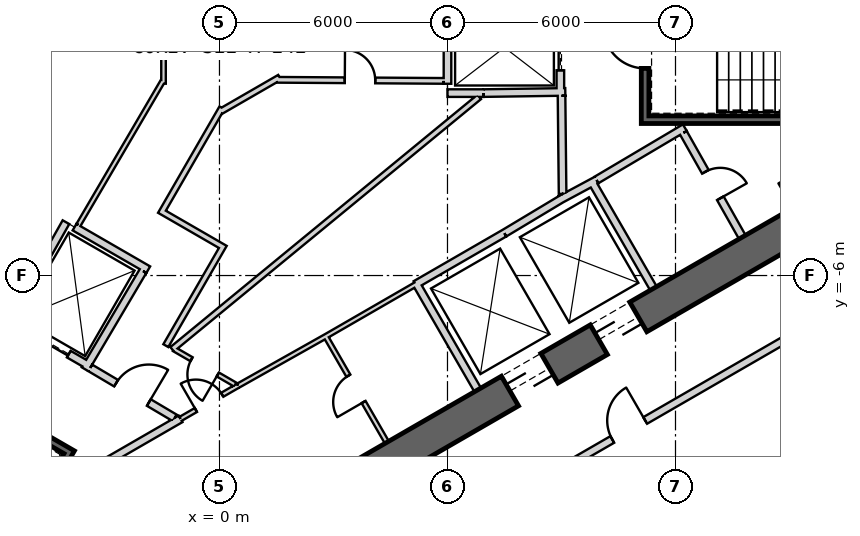
"""IFC4 building model, lengths in metres.
Left out: names, types, materials, properties, quantities, classifications, styles, units other than length and angle.
Written with IfcOpenShell. Run it as: python <this file> out.ifc"""

import sys

from ifc_helpers import new_model, si_unit, direction, frame, frame_2d, origin, place, context, subcontext, project, spatial, rectangle, extrude, element, fill, save


model = new_model("IFC4")
c1 = context("Model", 3, precision=1e-05, world=origin(), true_north=direction((0.0, 1.0)))
c2 = subcontext(c1, "Body", "Model", "MODEL_VIEW")
j1 = project(units=[si_unit("LENGTHUNIT", "METRE"), si_unit("PLANEANGLEUNIT", "RADIAN")], contexts=[c1])
p1 = place(None, origin())
s1 = spatial("IfcSite", under=j1, at=p1, CompositionType="ELEMENT")
p2 = place(p1, origin())
s2 = spatial("IfcBuilding", under=s1, at=p2, CompositionType="ELEMENT")
p3 = place(p2, frame((0.0, 0.0, 368.9)))
s3 = spatial("IfcBuildingStorey", under=s2, at=p3, CompositionType="ELEMENT", Elevation=368.9)
p4 = place(p3, frame((-7.825, -17.97, 0.0), z_axis=(0.0, 0.0, 1.0), x_axis=(0.866028369851, 0.499994862586, 0.0)))
e1 = element("IfcWall", 1, at=p4, inside=s3, PredefinedType="SHEAR", context=c2, shape_type="SweptSolid", body=[
    extrude(rectangle(XDim=31.523, YDim=0.9, at=frame_2d((15.762, 0.0))), origin(), (0.0, 0.0, 1.0), 3.9),
])
p5 = place(p4, frame((17.862, 0.0, 0.0)))
e2 = element("IfcOpeningElement", 2, at=p5, cuts=e1, PredefinedType="OPENING", context=c2, shape_type="SweptSolid", body=[
    extrude(rectangle(XDim=1.2, YDim=2.4, at=frame_2d((0.6, 1.2))), frame((0.0, 0.46, 0.0), z_axis=(0.0, -1.0, 0.0), x_axis=(1.0, 0.0, 0.0)), (0.0, 0.0, 1.0), 0.92),
])
p6 = place(p4, frame((20.562, 0.0, 0.0)))
e3 = element("IfcOpeningElement", 3, at=p6, cuts=e1, PredefinedType="OPENING", context=c2, shape_type="SweptSolid", body=[
    extrude(rectangle(XDim=1.2, YDim=2.4, at=frame_2d((0.6, 1.2))), frame((0.0, 0.46, 0.0), z_axis=(0.0, -1.0, 0.0), x_axis=(1.0, 0.0, 0.0)), (0.0, 0.0, 1.0), 0.92),
])
p7 = place(p4, frame((26.712, 0.0, 0.0)))
e4 = element("IfcOpeningElement", 4, at=p7, cuts=e1, PredefinedType="OPENING", context=c2, shape_type="SweptSolid", body=[
    extrude(rectangle(XDim=1.2, YDim=2.4, at=frame_2d((0.6, 1.2))), frame((0.0, 0.46, 0.0), z_axis=(0.0, -1.0, 0.0), x_axis=(1.0, 0.0, 0.0)), (0.0, 0.0, 1.0), 0.92),
])
p8 = place(p4, frame((3.612, 0.0, 0.0)))
e5 = element("IfcOpeningElement", 5, at=p8, cuts=e1, PredefinedType="OPENING", context=c2, shape_type="SweptSolid", body=[
    extrude(rectangle(XDim=1.2, YDim=2.4, at=frame_2d((0.6, 1.2))), frame((0.0, 0.46, 0.0), z_axis=(0.0, -1.0, 0.0), x_axis=(1.0, 0.0, 0.0)), (0.0, 0.0, 1.0), 0.92),
])
p9 = place(p3, frame((6.795, -9.01, 0.0), z_axis=(0.0, 0.0, 1.0), x_axis=(-0.499984717929, 0.866034226713, 0.0)))
e6 = element("IfcWall", 6, at=p9, inside=s3, PredefinedType="PLUMBINGWALL", context=c2, shape_type="SweptSolid", body=[
    extrude(rectangle(XDim=3.25, YDim=0.2, at=frame_2d((1.625, 0.0))), origin(), (0.0, 0.0, 1.0), 3.6),
])
p10 = place(p3, frame((5.159, -6.236, 0.0), z_axis=(0.0, 0.0, 1.0), x_axis=(0.866036505625, 0.499980770555, 0.0)))
e7 = element("IfcWall", 7, at=p10, inside=s3, PredefinedType="PLUMBINGWALL", context=c2, shape_type="SweptSolid", body=[
    extrude(rectangle(XDim=2.7, YDim=0.2, at=frame_2d((1.35, 0.0))), origin(), (0.0, 0.0, 1.0), 3.6),
])
p11 = place(p3, frame((9.795, -3.525, 0.0), z_axis=(0.0, 0.0, 1.0), x_axis=(0.499984717929, -0.866034226713, 0.0)))
e8 = element("IfcWall", 8, at=p11, inside=s3, PredefinedType="PLUMBINGWALL", context=c2, shape_type="SweptSolid", body=[
    extrude(rectangle(XDim=3.25, YDim=0.2, at=frame_2d((1.625, 0.0))), origin(), (0.0, 0.0, 1.0), 3.6),
])
p12 = place(p3, frame((8.974, -3.999, 0.0), z_axis=(0.0, 0.0, 1.0), x_axis=(0.880907015104, 0.473289373154, 0.0)))
e9 = element("IfcWall", 9, at=p12, inside=s3, PredefinedType="PLUMBINGWALL", context=c2, shape_type="SweptSolid", body=[
    extrude(rectangle(XDim=1.078, YDim=0.2, at=frame_2d((0.539, 0.0))), origin(), (0.0, 0.0, 1.0), 3.6),
])
p13 = place(p3, frame((7.493, -4.878, 0.0), z_axis=(0.0, 0.0, 1.0), x_axis=(0.859981807212, 0.510324691999, 0.0)))
e10 = element("IfcWall", 10, at=p13, inside=s3, PredefinedType="PLUMBINGWALL", context=c2, shape_type="SweptSolid", body=[
    extrude(rectangle(XDim=1.845, YDim=0.2, at=frame_2d((0.922, 0.0))), origin(), (0.0, 0.0, 1.0), 3.6),
])
p14 = place(p3, frame((11.1, -1.9, -0.3), z_axis=(0.0, 0.0, 1.0), x_axis=(1.0, 0.0, 0.0)))
e11 = element("IfcWall", 11, at=p14, inside=s3, PredefinedType="SHEAR", context=c2, shape_type="SweptSolid", body=[
    extrude(rectangle(XDim=7.9, YDim=0.2, at=frame_2d((3.95, 0.0))), origin(), (0.0, 0.0, 1.0), 3.9),
])
p15 = place(p3, frame((11.2, -1.8, -0.3), z_axis=(0.0, 0.0, 1.0), x_axis=(0.0, 1.0, 0.0)))
e12 = element("IfcWall", 12, at=p15, inside=s3, PredefinedType="SHEAR", context=c2, shape_type="SweptSolid", body=[
    extrude(rectangle(XDim=3.6, YDim=0.2, at=frame_2d((1.8, 0.0))), origin(), (0.0, 0.0, 1.0), 3.9),
])
p16 = place(p15, frame((1.25, 0.0, 0.3)))
e13 = element("IfcOpeningElement", 13, at=p16, cuts=e12, PredefinedType="OPENING", context=c2, shape_type="SweptSolid", body=[
    extrude(rectangle(XDim=1.1, YDim=2.1, at=frame_2d((0.55, 1.05))), frame((0.0, 0.11, 0.0), z_axis=(0.0, -1.0, 0.0), x_axis=(1.0, 0.0, 0.0)), (0.0, 0.0, 1.0), 0.22),
])
p17 = place(p3, frame((8.97, 1.2, 0.0), z_axis=(0.0, 0.0, 1.0), x_axis=(0.0, -1.0, 0.0)))
e14 = element("IfcWall", 14, at=p17, inside=s3, PredefinedType="PLUMBINGWALL", context=c2, shape_type="SweptSolid", body=[
    extrude(rectangle(XDim=2.4, YDim=0.2, at=frame_2d((1.2, 0.0))), origin(), (0.0, 0.0, 1.0), 3.6),
])
p18 = place(p17, frame((0.6, 0.0, 0.0)))
e15 = element("IfcOpeningElement", 15, at=p18, cuts=e14, PredefinedType="OPENING", context=c2, shape_type="SweptSolid", body=[
    extrude(rectangle(XDim=1.2, YDim=2.4, at=frame_2d((0.6, 1.2))), frame((0.0, 0.11, 0.0), z_axis=(0.0, -1.0, 0.0), x_axis=(1.0, 0.0, 0.0)), (0.0, 0.0, 1.0), 0.22),
])
p19 = place(p3, frame((5.9, -1.201, 0.0), z_axis=(0.0, 0.0, 1.0), x_axis=(0.999950064753, 0.009993397809, 0.0)))
e16 = element("IfcWall", 16, at=p19, inside=s3, PredefinedType="PLUMBINGWALL", context=c2, shape_type="SweptSolid", body=[
    extrude(rectangle(XDim=3.2, YDim=0.2, at=frame_2d((1.6, 0.0))), origin(), (0.0, 0.0, 1.0), 3.6),
])
p20 = place(p3, frame((6.0, -1.1, 0.0), z_axis=(0.0, 0.0, 1.0), x_axis=(0.0, 1.0, 0.0)))
e17 = element("IfcWall", 17, at=p20, inside=s3, PredefinedType="PLUMBINGWALL", context=c2, shape_type="SweptSolid", body=[
    extrude(rectangle(XDim=2.28, YDim=0.2, at=frame_2d((1.14, 0.0))), origin(), (0.0, 0.0, 1.0), 3.6),
])
p21 = place(p3, frame((-3.905, -10.563, -0.3), z_axis=(0.0, 0.0, 1.0), x_axis=(-0.500012932018, -0.866017937352, 0.0)))
e18 = element("IfcWall", 18, at=p21, inside=s3, PredefinedType="SHEAR", context=c2, shape_type="SweptSolid", body=[
    extrude(rectangle(XDim=8.1, YDim=0.2, at=frame_2d((4.05, 0.0))), origin(), (0.0, 0.0, 1.0), 3.9),
])
p22 = place(p3, frame((-4.041, -10.599, -0.3), z_axis=(0.0, 0.0, 1.0), x_axis=(-0.866047807691, 0.499961193289, 0.0)))
e19 = element("IfcWall", 19, at=p22, inside=s3, PredefinedType="SHEAR", context=c2, shape_type="SweptSolid", body=[
    extrude(rectangle(XDim=3.6, YDim=0.2, at=frame_2d((1.8, 0.0))), origin(), (0.0, 0.0, 1.0), 3.9),
])
p23 = place(p22, frame((1.25, 0.0, 0.3)))
e20 = element("IfcOpeningElement", 20, at=p23, cuts=e19, PredefinedType="OPENING", context=c2, shape_type="SweptSolid", body=[
    extrude(rectangle(XDim=1.1, YDim=2.1, at=frame_2d((0.55, 1.05))), frame((0.0, 0.11, 0.0), z_axis=(0.0, -1.0, 0.0), x_axis=(1.0, 0.0, 0.0)), (0.0, 0.0, 1.0), 0.22),
])
p24 = place(p3, frame((-3.446, -8.368, 0.0), z_axis=(0.0, 0.0, 1.0), x_axis=(-0.866024647952, 0.500001309137, 0.0)))
e21 = element("IfcWall", 21, at=p24, inside=s3, PredefinedType="PLUMBINGWALL", context=c2, shape_type="SweptSolid", body=[
    extrude(rectangle(XDim=2.4, YDim=0.2, at=frame_2d((1.2, 0.0))), origin(), (0.0, 0.0, 1.0), 3.6),
])
p25 = place(p24, frame((0.6, 0.0, 0.0)))
e22 = element("IfcOpeningElement", 22, at=p25, cuts=e21, PredefinedType="OPENING", context=c2, shape_type="SweptSolid", body=[
    extrude(rectangle(XDim=1.2, YDim=2.4, at=frame_2d((0.6, 1.2))), frame((0.0, 0.11, 0.0), z_axis=(0.0, -1.0, 0.0), x_axis=(1.0, 0.0, 0.0)), (0.0, 0.0, 1.0), 0.22),
])
p26 = place(p3, frame((-1.961, -5.796, 0.0), z_axis=(0.0, 0.0, 1.0), x_axis=(-0.508647062354, -0.860975125052, 0.0)))
e23 = element("IfcWall", 23, at=p26, inside=s3, PredefinedType="PLUMBINGWALL", context=c2, shape_type="SweptSolid", body=[
    extrude(rectangle(XDim=3.1, YDim=0.2, at=frame_2d((1.55, 0.0))), origin(), (0.0, 0.0, 1.0), 3.6),
])
p27 = place(p3, frame((-3.99, -4.509, 0.0), z_axis=(0.0, 0.0, 1.0), x_axis=(-0.491358283181, -0.870957540612, 0.0)))
e24 = element("IfcWall", 24, at=p27, inside=s3, PredefinedType="PLUMBINGWALL", context=c2, shape_type="SweptSolid", body=[
    extrude(rectangle(XDim=3.2, YDim=0.2, at=frame_2d((1.6, 0.0))), origin(), (0.0, 0.0, 1.0), 3.6),
])
p28 = place(p3, frame((-3.953, -4.646, 0.0), z_axis=(0.0, 0.0, 1.0), x_axis=(0.866065302921, -0.4999308863, 0.0)))
e25 = element("IfcWall", 25, at=p28, inside=s3, PredefinedType="PLUMBINGWALL", context=c2, shape_type="SweptSolid", body=[
    extrude(rectangle(XDim=2.264, YDim=0.2, at=frame_2d((1.132, 0.0))), origin(), (0.0, 0.0, 1.0), 3.6),
])
p29 = place(p3, frame((2.067, -11.74, 0.0), z_axis=(0.0, 0.0, 1.0), x_axis=(-0.499984717929, 0.866034226713, 0.0)))
e26 = element("IfcWall", 26, at=p29, inside=s3, PredefinedType="PARTITIONING", context=c2, shape_type="SweptSolid", body=[
    extrude(rectangle(XDim=3.25, YDim=0.12, at=frame_2d((1.625, 0.0))), origin(), (0.0, 0.0, 1.0), 3.6),
])
p30 = place(p3, frame((-1.024, -9.771, 0.0), z_axis=(0.0, 0.0, 1.0), x_axis=(-0.866029903013, -0.499992207027, 0.0)))
e27 = element("IfcWall", 27, at=p30, inside=s3, PredefinedType="PARTITIONING", context=c2, shape_type="SweptSolid", body=[
    extrude(rectangle(XDim=3.578, YDim=0.2, at=frame_2d((1.789, 0.0))), origin(), (0.0, 0.0, 1.0), 3.6),
])
p31 = place(p30, frame((1.389, 0.0, 0.0)))
e28 = element("IfcOpeningElement", 28, at=p31, cuts=e27, PredefinedType="OPENING", context=c2, shape_type="SweptSolid", body=[
    extrude(rectangle(XDim=0.8, YDim=2.1, at=frame_2d((0.4, 1.05))), frame((0.0, 0.11, 0.0), z_axis=(0.0, -1.0, 0.0), x_axis=(1.0, 0.0, 0.0)), (0.0, 0.0, 1.0), 0.22),
])
p32 = place(p3, frame((-1.023, -9.772, 0.0), z_axis=(0.0, 0.0, 1.0), x_axis=(0.874290944206, 0.485402250592, 0.0)))
e29 = element("IfcWall", 29, at=p32, inside=s3, PredefinedType="PARTITIONING", context=c2, shape_type="SweptSolid", body=[
    extrude(rectangle(XDim=1.723, YDim=0.12, at=frame_2d((0.861, 0.0))), origin(), (0.0, 0.0, 1.0), 3.6),
])
p33 = place(p3, frame((0.483, -8.936, 0.0), z_axis=(0.0, 0.0, 1.0), x_axis=(0.866028230842, 0.499995103361, 0.0)))
e30 = element("IfcWall", 30, at=p33, inside=s3, PredefinedType="PARTITIONING", context=c2, shape_type="SweptSolid", body=[
    extrude(rectangle(XDim=5.4, YDim=0.12, at=frame_2d((2.7, 0.0))), origin(), (0.0, 0.0, 1.0), 3.6),
])
p34 = place(p33, frame((2.3, 0.0, 0.0)))
e31 = element("IfcOpeningElement", 31, at=p34, cuts=e30, PredefinedType="OPENING", context=c2, shape_type="SweptSolid", body=[
    extrude(rectangle(XDim=0.8, YDim=2.1, at=frame_2d((0.4, 1.05))), frame((0.0, 0.07, 0.0), z_axis=(0.0, -1.0, 0.0), x_axis=(1.0, 0.0, 0.0)), (0.0, 0.0, 1.0), 0.14),
])
p35 = place(p3, frame((12.245, -2.109, 0.0), z_axis=(0.0, 0.0, 1.0), x_axis=(-0.860414880418, -0.509594185166, 0.0)))
e32 = element("IfcWall", 32, at=p35, inside=s3, PredefinedType="PARTITIONING", context=c2, shape_type="SweptSolid", body=[
    extrude(rectangle(XDim=2.7, YDim=0.2, at=frame_2d((1.35, 0.0))), origin(), (0.0, 0.0, 1.0), 3.6),
])
p36 = place(p3, frame((13.758, -4.99, 0.0), z_axis=(0.0, 0.0, 1.0), x_axis=(-0.491993409184, 0.87059892334, 0.0)))
e33 = element("IfcWall", 33, at=p36, inside=s3, PredefinedType="PARTITIONING", context=c2, shape_type="SweptSolid", body=[
    extrude(rectangle(XDim=3.15, YDim=0.2, at=frame_2d((1.575, 0.0))), origin(), (0.0, 0.0, 1.0), 3.6),
])
p37 = place(p36, frame((1.175, 0.0, 0.0)))
e34 = element("IfcOpeningElement", 34, at=p37, cuts=e33, PredefinedType="OPENING", context=c2, shape_type="SweptSolid", body=[
    extrude(rectangle(XDim=0.8, YDim=2.1, at=frame_2d((0.4, 1.05))), frame((0.0, 0.11, 0.0), z_axis=(0.0, -1.0, 0.0), x_axis=(1.0, 0.0, 0.0)), (0.0, 0.0, 1.0), 0.22),
])
p38 = place(p3, frame((9.029, -3.851, 0.0), z_axis=(0.0, 0.0, 1.0), x_axis=(-0.010783593937, 0.99994185536, 0.0)))
e35 = element("IfcWall", 35, at=p38, inside=s3, PredefinedType="PARTITIONING", context=c2, shape_type="SweptSolid", body=[
    extrude(rectangle(XDim=2.581, YDim=0.2, at=frame_2d((1.291, 0.0))), origin(), (0.0, 0.0, 1.0), 3.6),
])
p39 = place(p38, frame((0.791, 0.0, 0.0)))
e36 = element("IfcOpeningElement", 36, at=p39, cuts=e35, PredefinedType="OPENING", context=c2, shape_type="SweptSolid", body=[
    extrude(rectangle(XDim=1.0, YDim=2.1, at=frame_2d((0.5, 1.05))), frame((0.0, 0.11, 0.0), z_axis=(0.0, -1.0, 0.0), x_axis=(1.0, 0.0, 0.0)), (0.0, 0.0, 1.0), 0.22),
])
p40 = place(p3, frame((-3.401, -8.43, 0.0), z_axis=(0.0, 0.0, 1.0), x_axis=(0.860630814782, -0.509229418482, 0.0)))
e37 = element("IfcWall", 37, at=p40, inside=s3, PredefinedType="PARTITIONING", context=c2, shape_type="SweptSolid", body=[
    extrude(rectangle(XDim=2.582, YDim=0.2, at=frame_2d((1.291, 0.0))), origin(), (0.0, 0.0, 1.0), 3.6),
])
p41 = place(p3, frame((0.224, -1.761, 0.0), z_axis=(0.0, 0.0, 1.0), x_axis=(-0.494327216836, -0.869275907118, 0.0)))
e38 = element("IfcWall", 38, at=p41, inside=s3, PredefinedType="PARTITIONING", context=c2, shape_type="SweptSolid", body=[
    extrude(rectangle(XDim=4.487, YDim=0.12, at=frame_2d((2.244, 0.0))), origin(), (0.0, 0.0, 1.0), 3.6),
])
p42 = place(p41, frame((1.895, 0.0, 0.0)))
e39 = element("IfcOpeningElement", 39, at=p42, cuts=e38, PredefinedType="OPENING", context=c2, shape_type="SweptSolid", body=[
    extrude(rectangle(XDim=0.8, YDim=2.1, at=frame_2d((0.4, 1.05))), frame((0.0, 0.07, 0.0), z_axis=(0.0, -1.0, 0.0), x_axis=(1.0, 0.0, 0.0)), (0.0, 0.0, 1.0), 0.14),
])
p43 = place(p3, frame((1.605, -1.023, 0.0), z_axis=(0.0, 0.0, 1.0), x_axis=(-0.866001581989, -0.50004125829, 0.0)))
e40 = element("IfcWall", 40, at=p43, inside=s3, PredefinedType="PARTITIONING", context=c2, shape_type="SweptSolid", body=[
    extrude(rectangle(XDim=1.635, YDim=0.12, at=frame_2d((0.817, 0.0))), origin(), (0.0, 0.0, 1.0), 3.6),
])
p44 = place(p3, frame((4.56, -1.075, 0.0), z_axis=(0.0, 0.0, 1.0), x_axis=(-1.0, 0.0, 0.0)))
e41 = element("IfcWall", 41, at=p44, inside=s3, PredefinedType="PARTITIONING", context=c2, shape_type="SweptSolid", body=[
    extrude(rectangle(XDim=3.026, YDim=0.12, at=frame_2d((1.513, 0.0))), origin(), (0.0, 0.0, 1.0), 3.6),
])
p45 = place(p3, frame((4.5, -2.76, 0.0), z_axis=(0.0, 0.0, 1.0), x_axis=(0.0, 1.0, 0.0)))
e42 = element("IfcWall", 42, at=p45, inside=s3, PredefinedType="PARTITIONING", context=c2, shape_type="SweptSolid", body=[
    extrude(rectangle(XDim=1.625, YDim=0.12, at=frame_2d((0.812, 0.0))), origin(), (0.0, 0.0, 1.0), 3.6),
])
p46 = place(p3, frame((7.56, -2.7, 0.0), z_axis=(0.0, 0.0, 1.0), x_axis=(-1.0, 0.0, 0.0)))
e43 = element("IfcWall", 43, at=p46, inside=s3, PredefinedType="PARTITIONING", context=c2, shape_type="SweptSolid", body=[
    extrude(rectangle(XDim=3.0, YDim=0.12, at=frame_2d((1.5, 0.0))), origin(), (0.0, 0.0, 1.0), 3.6),
])
p47 = place(p3, frame((7.475, -4.865, 0.0), z_axis=(0.0, 0.0, 1.0), x_axis=(0.011716133148, 0.999931363757, 0.0)))
e44 = element("IfcWall", 44, at=p47, inside=s3, PredefinedType="PARTITIONING", context=c2, shape_type="SweptSolid", body=[
    extrude(rectangle(XDim=2.105, YDim=0.12, at=frame_2d((1.052, 0.0))), origin(), (0.0, 0.0, 1.0), 3.6),
])
p48 = place(p3, frame((-1.689, -0.905, 0.0), z_axis=(0.0, 0.0, 1.0), x_axis=(0.0, 1.0, 0.0)))
e45 = element("IfcWall", 45, at=p48, inside=s3, PredefinedType="PLUMBINGWALL", context=c2, shape_type="SweptSolid", body=[
    extrude(rectangle(XDim=1.656, YDim=0.15, at=frame_2d((0.828, 0.0))), origin(), (0.0, 0.0, 1.0), 3.6),
])
p49 = place(p3, frame((-3.219, -3.425, 0.0), z_axis=(0.0, 0.0, 1.0), x_axis=(0.499996236806, 0.866027576455, 0.0)))
e46 = element("IfcWall", 46, at=p49, inside=s3, PredefinedType="PLUMBINGWALL", context=c2, shape_type="SweptSolid", body=[
    extrude(rectangle(XDim=3.036, YDim=0.15, at=frame_2d((1.518, 0.0))), origin(), (0.0, 0.0, 1.0), 3.6),
])
p50 = place(p49, frame((1.156, 0.0, 0.0)))
e47 = element("IfcOpeningElement", 47, at=p50, cuts=e46, PredefinedType="OPENING", context=c2, shape_type="SweptSolid", body=[
    extrude(rectangle(XDim=0.8, YDim=2.1, at=frame_2d((0.4, 1.05))), frame((0.0, 0.085, 0.0), z_axis=(0.0, -1.0, 0.0), x_axis=(1.0, 0.0, 0.0)), (0.0, 0.0, 1.0), 0.17),
])
p51 = place(p3, frame((-4.653, -2.51, 0.0), z_axis=(0.0, 0.0, 1.0), x_axis=(0.866053003207, -0.499952193351, 0.0)))
e48 = element("IfcWall", 48, at=p51, inside=s3, PredefinedType="PLUMBINGWALL", context=c2, shape_type="SweptSolid", body=[
    extrude(rectangle(XDim=1.625, YDim=0.15, at=frame_2d((0.812, 0.0))), origin(), (0.0, 0.0, 1.0), 3.6),
])
p52 = place(p3, frame((-6.852, -20.93, 0.0), z_axis=(0.0, 0.0, 1.0), x_axis=(0.866025322732, 0.500000140387, 0.0)))
e49 = element("IfcWall", 49, at=p52, inside=s3, PredefinedType="PARTITIONING", context=c2, shape_type="SweptSolid", body=[
    extrude(rectangle(XDim=22.857, YDim=0.2, at=frame_2d((11.428, 0.0))), origin(), (0.0, 0.0, 1.0), 2.97),
])
p53 = place(p52, frame((10.9, 0.0, 0.0)))
e50 = element("IfcOpeningElement", 50, at=p53, cuts=e49, PredefinedType="OPENING", context=c2, shape_type="SweptSolid", body=[
    extrude(rectangle(XDim=1.0, YDim=2.1, at=frame_2d((0.5, 1.05))), frame((0.0, 0.11, 0.0), z_axis=(0.0, -1.0, 0.0), x_axis=(1.0, 0.0, 0.0)), (0.0, 0.0, 1.0), 0.22),
])
p54 = place(p3, frame((12.977, -9.482, 0.0), z_axis=(0.0, 0.0, 1.0), x_axis=(0.866030756363, 0.499990728947, 0.0)))
e51 = element("IfcWall", 51, at=p54, inside=s3, PredefinedType="PARTITIONING", context=c2, shape_type="SweptSolid", body=[
    extrude(rectangle(XDim=9.742, YDim=0.12, at=frame_2d((4.871, 0.0))), origin(), (0.0, 0.0, 1.0), 2.97),
])
p55 = place(p54, frame((4.332, 0.0, 0.0)))
e52 = element("IfcOpeningElement", 52, at=p55, cuts=e51, PredefinedType="OPENING", context=c2, shape_type="SweptSolid", body=[
    extrude(rectangle(XDim=1.0, YDim=2.1, at=frame_2d((0.5, 1.05))), frame((0.0, 0.07, 0.0), z_axis=(0.0, -1.0, 0.0), x_axis=(1.0, 0.0, 0.0)), (0.0, 0.0, 1.0), 0.14),
])
p56 = place(p3, frame((16.726, -15.123, 0.0), z_axis=(0.0, 0.0, 1.0), x_axis=(-0.565749931425, 0.824576870336, 0.0)))
e53 = element("IfcWall", 53, at=p56, inside=s3, PredefinedType="PARTITIONING", context=c2, shape_type="SweptSolid", body=[
    extrude(rectangle(XDim=6.68, YDim=0.2, at=frame_2d((3.34, 0.0))), origin(), (0.0, 0.0, 1.0), 3.6),
])
p57 = place(p16, origin())
e54 = element("IfcDoor", 54, at=p57, inside=s3, OperationType="SINGLE_SWING_RIGHT", PredefinedType="USERDEFINED", context=c2, shape_type="SweptSolid", body=[
    extrude(rectangle(XDim=1.1, YDim=2.1, at=frame_2d((0.55, 1.05))), frame((0.0, 0.025, 0.0), z_axis=(0.0, -1.0, 0.0), x_axis=(1.0, 0.0, 0.0)), (0.0, 0.0, 1.0), 0.05),
])
fill(e13, e54)
p58 = place(p39, origin())
e55 = element("IfcDoor", 55, at=p58, inside=s3, OperationType="SINGLE_SWING_RIGHT", PredefinedType="USERDEFINED", context=c2, shape_type="SweptSolid", body=[
    extrude(rectangle(XDim=1.0, YDim=2.1, at=frame_2d((0.5, 1.05))), frame((0.0, 0.025, 0.0), z_axis=(0.0, -1.0, 0.0), x_axis=(1.0, 0.0, 0.0)), (0.0, 0.0, 1.0), 0.05),
])
fill(e36, e55)
p59 = place(p18, origin())
e56 = element("IfcDoor", 56, at=p59, inside=s3, OperationType="SLIDING_TO_LEFT", PredefinedType="USERDEFINED", context=c2, shape_type="SweptSolid", body=[
    extrude(rectangle(XDim=1.2, YDim=2.4, at=frame_2d((0.6, 1.2))), frame((0.0, 0.025, 0.0), z_axis=(0.0, -1.0, 0.0), x_axis=(1.0, 0.0, 0.0)), (0.0, 0.0, 1.0), 0.05),
])
fill(e15, e56)
p60 = place(p25, origin())
e57 = element("IfcDoor", 57, at=p60, inside=s3, OperationType="SLIDING_TO_LEFT", PredefinedType="USERDEFINED", context=c2, shape_type="SweptSolid", body=[
    extrude(rectangle(XDim=1.2, YDim=2.4, at=frame_2d((0.6, 1.2))), frame((0.0, 0.025, 0.0), z_axis=(0.0, -1.0, 0.0), x_axis=(1.0, 0.0, 0.0)), (0.0, 0.0, 1.0), 0.05),
])
fill(e22, e57)
p61 = place(p42, origin())
e58 = element("IfcDoor", 58, at=p61, inside=s3, OperationType="SINGLE_SWING_RIGHT", PredefinedType="USERDEFINED", context=c2, shape_type="SweptSolid", body=[
    extrude(rectangle(XDim=0.8, YDim=2.1, at=frame_2d((0.4, 1.05))), frame((0.0, 0.025, 0.0), z_axis=(0.0, -1.0, 0.0), x_axis=(1.0, 0.0, 0.0)), (0.0, 0.0, 1.0), 0.05),
])
fill(e39, e58)
p62 = place(p50, origin())
e59 = element("IfcDoor", 59, at=p62, inside=s3, OperationType="SINGLE_SWING_LEFT", PredefinedType="USERDEFINED", context=c2, shape_type="SweptSolid", body=[
    extrude(rectangle(XDim=0.8, YDim=2.1, at=frame_2d((0.4, 1.05))), frame((0.0, 0.025, 0.0), z_axis=(0.0, -1.0, 0.0), x_axis=(1.0, 0.0, 0.0)), (0.0, 0.0, 1.0), 0.05),
])
fill(e47, e59)
p63 = place(p31, origin())
e60 = element("IfcDoor", 60, at=p63, inside=s3, OperationType="SINGLE_SWING_LEFT", PredefinedType="USERDEFINED", context=c2, shape_type="SweptSolid", body=[
    extrude(rectangle(XDim=0.8, YDim=2.1, at=frame_2d((0.4, 1.05))), frame((0.0, 0.025, 0.0), z_axis=(0.0, -1.0, 0.0), x_axis=(1.0, 0.0, 0.0)), (0.0, 0.0, 1.0), 0.05),
])
fill(e28, e60)
p64 = place(p34, origin())
e61 = element("IfcDoor", 61, at=p64, inside=s3, OperationType="SINGLE_SWING_LEFT", PredefinedType="USERDEFINED", context=c2, shape_type="SweptSolid", body=[
    extrude(rectangle(XDim=0.8, YDim=2.1, at=frame_2d((0.4, 1.05))), frame((0.0, 0.025, 0.0), z_axis=(0.0, -1.0, 0.0), x_axis=(1.0, 0.0, 0.0)), (0.0, 0.0, 1.0), 0.05),
])
fill(e31, e61)
p65 = place(p37, origin())
e62 = element("IfcDoor", 62, at=p65, inside=s3, OperationType="SINGLE_SWING_LEFT", PredefinedType="USERDEFINED", context=c2, shape_type="SweptSolid", body=[
    extrude(rectangle(XDim=0.8, YDim=2.1, at=frame_2d((0.4, 1.05))), frame((0.0, 0.025, 0.0), z_axis=(0.0, -1.0, 0.0), x_axis=(1.0, 0.0, 0.0)), (0.0, 0.0, 1.0), 0.05),
])
fill(e34, e62)
p66 = place(p5, origin())
e63 = element("IfcDoor", 63, at=p66, inside=s3, OperationType="SLIDING_TO_LEFT", PredefinedType="USERDEFINED", context=c2, shape_type="SweptSolid", body=[
    extrude(rectangle(XDim=1.2, YDim=2.4, at=frame_2d((0.6, 1.2))), frame((0.0, 0.025, 0.0), z_axis=(0.0, -1.0, 0.0), x_axis=(1.0, 0.0, 0.0)), (0.0, 0.0, 1.0), 0.05),
])
fill(e2, e63)
p67 = place(p6, origin())
e64 = element("IfcDoor", 64, at=p67, inside=s3, OperationType="SLIDING_TO_LEFT", PredefinedType="USERDEFINED", context=c2, shape_type="SweptSolid", body=[
    extrude(rectangle(XDim=1.2, YDim=2.4, at=frame_2d((0.6, 1.2))), frame((0.0, 0.025, 0.0), z_axis=(0.0, -1.0, 0.0), x_axis=(1.0, 0.0, 0.0)), (0.0, 0.0, 1.0), 0.05),
])
fill(e3, e64)
save(model, sys.argv[1])
